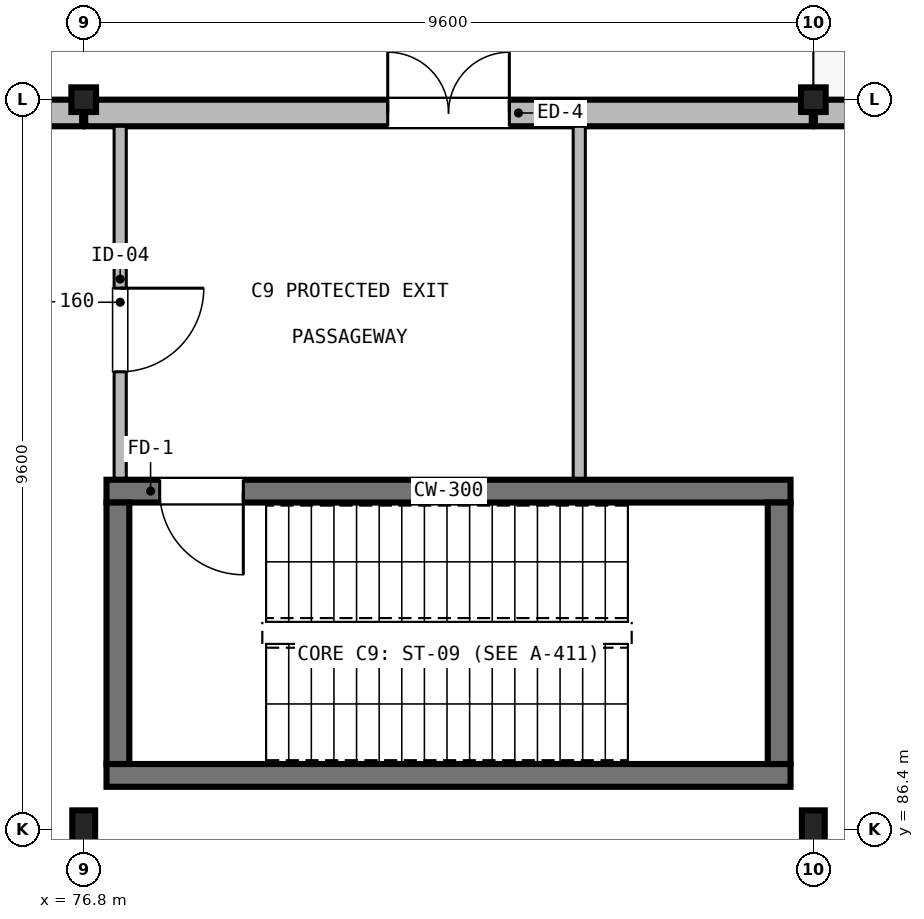
"""IFC4 building model, lengths in metres.
Left out: names, types, materials, properties, quantities, classifications, styles, units other than length and angle.
Written with IfcOpenShell. Run it as: python <this file> out.ifc"""

import sys

from ifc_helpers import new_model, si_unit, direction, frame, frame_2d, origin, origin_2d, place, context, subcontext, project, spatial, rectangle, hollow_circle, i_section, extrude, element, fill, save


model = new_model("IFC4")
c1 = context("Model", 3, precision=1e-05, world=origin(), true_north=direction((0.0, 1.0)))
c2 = subcontext(c1, "Body", "Model", "MODEL_VIEW")
j1 = project(units=[si_unit("LENGTHUNIT", "METRE"), si_unit("PLANEANGLEUNIT", "RADIAN")], contexts=[c1])
p1 = place(None, origin())
s1 = spatial("IfcSite", under=j1, at=p1, CompositionType="ELEMENT")
p2 = place(p1, origin())
s2 = spatial("IfcBuilding", under=s1, at=p2, CompositionType="ELEMENT")
p3 = place(p2, origin())
s3 = spatial("IfcBuildingStorey", under=s2, at=p3, CompositionType="ELEMENT", Elevation=0.0)
p4 = place(p3, frame((76.8, 86.4, -0.36), z_axis=(0.0, 0.0, 1.0), x_axis=(1.0, 0.0, 0.0)))
e1 = element("IfcColumn", 1, at=p4, inside=s3, PredefinedType="COLUMN", context=c2, shape_type="SweptSolid", body=[
    extrude(i_section(OverallWidth=0.3, OverallDepth=0.5, WebThickness=0.014, FlangeThickness=0.028, FilletRadius=0.027, at=origin_2d()), origin(), (0.0, 0.0, 1.0), 6.11),
])
p5 = place(p3, frame((76.8, 96.0, -0.2), z_axis=(0.0, 0.0, 1.0), x_axis=(1.0, 0.0, 0.0)))
e2 = element("IfcColumn", 2, at=p5, inside=s3, PredefinedType="COLUMN", context=c2, shape_type="SweptSolid", body=[
    extrude(hollow_circle(Radius=0.162, WallThickness=0.012, at=origin_2d()), origin(), (0.0, 0.0, 1.0), 6.2),
])
p6 = place(p3, frame((86.4, 86.4, -0.36), z_axis=(0.0, 0.0, 1.0), x_axis=(1.0, 0.0, 0.0)))
e3 = element("IfcColumn", 3, at=p6, inside=s3, PredefinedType="COLUMN", context=c2, shape_type="SweptSolid", body=[
    extrude(i_section(OverallWidth=0.3, OverallDepth=0.5, WebThickness=0.014, FlangeThickness=0.028, FilletRadius=0.027, at=origin_2d()), origin(), (0.0, 0.0, 1.0), 6.11),
])
p7 = place(p3, frame((86.4, 96.0, -0.2), z_axis=(0.0, 0.0, 1.0), x_axis=(1.0, 0.0, 0.0)))
e4 = element("IfcColumn", 4, at=p7, inside=s3, PredefinedType="COLUMN", context=c2, shape_type="SweptSolid", body=[
    extrude(hollow_circle(Radius=0.162, WallThickness=0.012, at=origin_2d()), origin(), (0.0, 0.0, 1.0), 6.2),
])
p8 = place(p3, frame((77.1, 87.11, 0.0), z_axis=(0.0, 0.0, 1.0), x_axis=(1.0, 0.0, 0.0)))
e5 = element("IfcWall", 5, at=p8, inside=s3, PredefinedType="SHEAR", context=c2, shape_type="SweptSolid", body=[
    extrude(rectangle(XDim=9.0, YDim=0.3, at=frame_2d((4.5, 0.0))), origin(), (0.0, 0.0, 1.0), 5.75),
])
p9 = place(p3, frame((86.1, 90.85, 0.0), z_axis=(0.0, 0.0, 1.0), x_axis=(-1.0, 0.0, 0.0)))
e6 = element("IfcWall", 6, at=p9, inside=s3, PredefinedType="SHEAR", context=c2, shape_type="SweptSolid", body=[
    extrude(rectangle(XDim=9.0, YDim=0.3, at=frame_2d((4.5, 0.0))), origin(), (0.0, 0.0, 1.0), 5.75),
])
p10 = place(p9, frame((7.2, 0.0, 0.0)))
e7 = element("IfcOpeningElement", 7, at=p10, cuts=e6, PredefinedType="OPENING", context=c2, shape_type="SweptSolid", body=[
    extrude(rectangle(XDim=1.1, YDim=2.15, at=frame_2d((0.55, 1.075))), frame((0.0, 0.16, 0.0), z_axis=(0.0, -1.0, 0.0), x_axis=(1.0, 0.0, 0.0)), (0.0, 0.0, 1.0), 0.32),
])
for number, where, z_axis, x_axis in (
    (8, (77.25, 87.26, 0.0), (0.0, 0.0, 1.0), (0.0, 1.0, 0.0)),
    (9, (85.95, 90.7, 0.0), (0.0, 0.0, 1.0), (0.0, -1.0, 0.0)),
):
    element("IfcWall", number, at=place(p3, frame(where, z_axis=z_axis, x_axis=x_axis)), inside=s3, PredefinedType="SHEAR", context=c2, shape_type="SweptSolid", body=[
        extrude(rectangle(XDim=3.44, YDim=0.3, at=frame_2d((1.72, 0.0))), origin(), (0.0, 0.0, 1.0), 5.75),
    ])
p11 = place(p3, frame((67.22, 95.825, 0.0), z_axis=(0.0, 0.0, 1.0), x_axis=(1.0, 0.0, 0.0)))
e10 = element("IfcWall", 10, at=p11, inside=s3, PredefinedType="SOLIDWALL", context=c2, shape_type="SweptSolid", body=[
    extrude(rectangle(XDim=9.56, YDim=0.35, at=frame_2d((4.78, 0.0))), origin(), (0.0, 0.0, 1.0), 5.4),
])
p12 = place(p11, frame((1.2, 0.0, 0.0)))
e11 = element("IfcOpeningElement", 11, at=p12, cuts=e10, PredefinedType="OPENING", context=c2, shape_type="SweptSolid", body=[
    extrude(rectangle(XDim=2.4, YDim=2.5, at=frame_2d((1.2, 1.25))), frame((0.0, 0.185, 0.0), z_axis=(0.0, -1.0, 0.0), x_axis=(1.0, 0.0, 0.0)), (0.0, 0.0, 1.0), 0.37),
])
p13 = place(p11, frame((5.4, 0.0, 0.0)))
e12 = element("IfcOpeningElement", 12, at=p13, cuts=e10, PredefinedType="OPENING", context=c2, shape_type="SweptSolid", body=[
    extrude(rectangle(XDim=1.8, YDim=2.25, at=frame_2d((0.9, 1.125))), frame((0.0, 0.185, 0.0), z_axis=(0.0, -1.0, 0.0), x_axis=(1.0, 0.0, 0.0)), (0.0, 0.0, 1.0), 0.37),
])
p14 = place(p3, frame((76.82, 95.825, 0.0), z_axis=(0.0, 0.0, 1.0), x_axis=(1.0, 0.0, 0.0)))
e13 = element("IfcWall", 13, at=p14, inside=s3, PredefinedType="SOLIDWALL", context=c2, shape_type="SweptSolid", body=[
    extrude(rectangle(XDim=9.56, YDim=0.35, at=frame_2d((4.78, 0.0))), origin(), (0.0, 0.0, 1.0), 5.4),
])
p15 = place(p14, frame((3.98, 0.0, 0.0)))
e14 = element("IfcOpeningElement", 14, at=p15, cuts=e13, PredefinedType="OPENING", context=c2, shape_type="SweptSolid", body=[
    extrude(rectangle(XDim=1.6, YDim=2.2, at=frame_2d((0.8, 1.1))), frame((0.0, 0.185, 0.0), z_axis=(0.0, -1.0, 0.0), x_axis=(1.0, 0.0, 0.0)), (0.0, 0.0, 1.0), 0.37),
])
p16 = place(p3, frame((86.42, 95.825, 0.0), z_axis=(0.0, 0.0, 1.0), x_axis=(1.0, 0.0, 0.0)))
e15 = element("IfcWall", 15, at=p16, inside=s3, PredefinedType="SOLIDWALL", context=c2, shape_type="SweptSolid", body=[
    extrude(rectangle(XDim=9.56, YDim=0.35, at=frame_2d((4.78, 0.0))), origin(), (0.0, 0.0, 1.0), 5.4),
])
p17 = place(p16, frame((1.2, 0.0, 0.0)))
e16 = element("IfcOpeningElement", 16, at=p17, cuts=e15, PredefinedType="OPENING", context=c2, shape_type="SweptSolid", body=[
    extrude(rectangle(XDim=2.6, YDim=2.5, at=frame_2d((1.3, 1.25))), frame((0.0, 0.185, 0.0), z_axis=(0.0, -1.0, 0.0), x_axis=(1.0, 0.0, 0.0)), (0.0, 0.0, 1.0), 0.37),
])
p18 = place(p16, frame((5.4, 0.0, 0.0)))
e17 = element("IfcOpeningElement", 17, at=p18, cuts=e15, PredefinedType="OPENING", context=c2, shape_type="SweptSolid", body=[
    extrude(rectangle(XDim=1.8, YDim=2.25, at=frame_2d((0.9, 1.125))), frame((0.0, 0.185, 0.0), z_axis=(0.0, -1.0, 0.0), x_axis=(1.0, 0.0, 0.0)), (0.0, 0.0, 1.0), 0.37),
])
p19 = place(p3, frame((77.28, 91.02, 0.0), z_axis=(0.0, 0.0, 1.0), x_axis=(0.0, 1.0, 0.0)))
e18 = element("IfcWall", 18, at=p19, inside=s3, PredefinedType="PARTITIONING", context=c2, shape_type="SweptSolid", body=[
    extrude(rectangle(XDim=4.63, YDim=0.16, at=frame_2d((2.315, 0.0))), origin(), (0.0, 0.0, 1.0), 5.39),
])
p20 = place(p19, frame((1.4, 0.0, 0.0)))
e19 = element("IfcOpeningElement", 19, at=p20, cuts=e18, PredefinedType="OPENING", context=c2, shape_type="SweptSolid", body=[
    extrude(rectangle(XDim=1.1, YDim=2.2, at=frame_2d((0.55, 1.1))), frame((0.0, 0.09, 0.0), z_axis=(0.0, -1.0, 0.0), x_axis=(1.0, 0.0, 0.0)), (0.0, 0.0, 1.0), 0.18),
])
p21 = place(p3, frame((83.32, 95.65, 0.0), z_axis=(0.0, 0.0, 1.0), x_axis=(0.0, -1.0, 0.0)))
e20 = element("IfcWall", 20, at=p21, inside=s3, PredefinedType="PARTITIONING", context=c2, shape_type="SweptSolid", body=[
    extrude(rectangle(XDim=4.63, YDim=0.16, at=frame_2d((2.315, 0.0))), origin(), (0.0, 0.0, 1.0), 5.39),
])
p22 = place(p10, origin())
e21 = element("IfcDoor", 21, at=p22, inside=s3, OperationType="SINGLE_SWING_LEFT", PredefinedType="DOOR", context=c2, shape_type="SweptSolid", body=[
    extrude(rectangle(XDim=1.1, YDim=2.15, at=frame_2d((0.55, 1.075))), frame((0.0, 0.025, 0.0), z_axis=(0.0, -1.0, 0.0), x_axis=(1.0, 0.0, 0.0)), (0.0, 0.0, 1.0), 0.05),
])
fill(e7, e21)
p23 = place(p15, origin())
e22 = element("IfcDoor", 22, at=p23, inside=s3, OperationType="DOUBLE_DOOR_SINGLE_SWING", PredefinedType="DOOR", context=c2, shape_type="SweptSolid", body=[
    extrude(rectangle(XDim=1.6, YDim=2.2, at=frame_2d((0.8, 1.1))), frame((0.0, 0.025, 0.0), z_axis=(0.0, -1.0, 0.0), x_axis=(1.0, 0.0, 0.0)), (0.0, 0.0, 1.0), 0.05),
])
fill(e14, e22)
p24 = place(p20, frame((1.1, 0.0, 0.0), z_axis=(0.0, 0.0, 1.0), x_axis=(-1.0, 0.0, 0.0)))
e23 = element("IfcDoor", 23, at=p24, inside=s3, OperationType="SINGLE_SWING_RIGHT", PredefinedType="DOOR", context=c2, shape_type="SweptSolid", body=[
    extrude(rectangle(XDim=1.1, YDim=2.2, at=frame_2d((0.55, 1.1))), frame((0.0, 0.025, 0.0), z_axis=(0.0, -1.0, 0.0), x_axis=(1.0, 0.0, 0.0)), (0.0, 0.0, 1.0), 0.05),
])
fill(e19, e23)
save(model, sys.argv[1])
